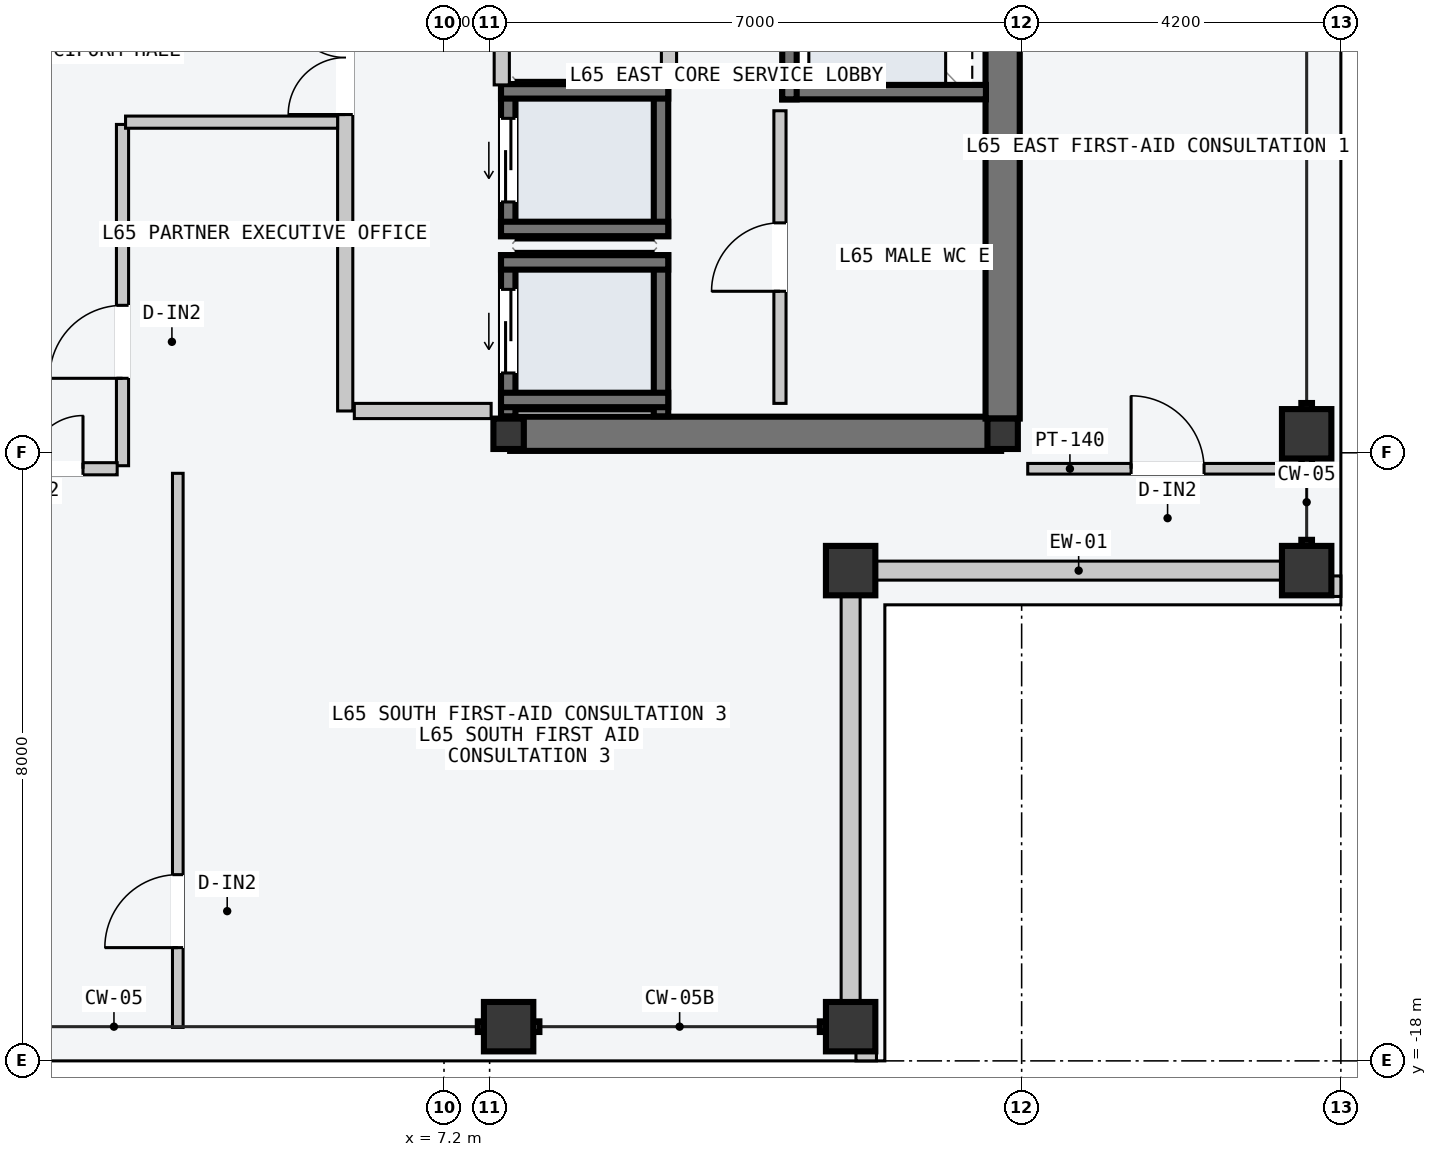
"""IFC4 building model, lengths in metres.
Left out: names, types, materials, properties, quantities, classifications, styles, units other than length and angle.
Written with IfcOpenShell. Run it as: python <this file> out.ifc"""

import sys

from ifc_helpers import new_model, si_unit, direction, frame, frame_2d, origin, origin_2d, place, context, subcontext, project, spatial, rectangle, hollow_rectangle, i_section, extrude, element, fill, save


model = new_model("IFC4")
c1 = context("Model", 3, precision=1e-05, world=origin(), true_north=direction((0.0, 1.0)))
c2 = subcontext(c1, "Body", "Model", "MODEL_VIEW")
j1 = project(units=[si_unit("LENGTHUNIT", "METRE"), si_unit("PLANEANGLEUNIT", "RADIAN")], contexts=[c1])
p1 = place(None, origin())
s1 = spatial("IfcSite", under=j1, at=p1, CompositionType="ELEMENT")
p2 = place(p1, origin())
s2 = spatial("IfcBuilding", under=s1, at=p2, CompositionType="ELEMENT")
p3 = place(p2, frame((0.0, 0.0, 247.2)))
s3 = spatial("IfcBuildingStorey", under=s2, at=p3, CompositionType="ELEMENT", Elevation=247.2)
p4 = place(p3, frame((8.07, -9.75, -0.2), z_axis=(0.0, 0.0, 1.0), x_axis=(1.0, 0.0, 0.0)))
e1 = element("IfcWall", 1, at=p4, inside=s3, PredefinedType="SHEAR", context=c2, shape_type="SweptSolid", body=[
    extrude(rectangle(XDim=6.46, YDim=0.45, at=frame_2d((3.23, 0.0))), origin(), (0.0, 0.0, 1.0), 3.6),
])
p5 = place(p3, frame((14.55, -9.55, -0.2), z_axis=(0.0, 0.0, 1.0), x_axis=(0.0, 1.0, 0.0)))
e2 = element("IfcWall", 2, at=p5, inside=s3, PredefinedType="SHEAR", context=c2, shape_type="SweptSolid", body=[
    extrude(rectangle(XDim=9.35, YDim=0.45, at=frame_2d((4.675, 0.0))), origin(), (0.0, 0.0, 1.0), 3.6),
])
for number, where, z_axis, x_axis in (
    (3, (8.05, -9.75, 0.0), (0.0, 0.0, 1.0), (1.0, 0.0, 0.0)),
    (4, (14.55, -9.75, 0.0), (0.0, 0.0, 1.0), (1.0, 0.0, 0.0)),
):
    element("IfcColumn", number, at=place(p3, frame(where, z_axis=z_axis, x_axis=x_axis)), inside=s3, PredefinedType="COLUMN", context=c2, shape_type="SweptSolid", body=[
        extrude(i_section(OverallWidth=0.4, OverallDepth=0.4, WebThickness=0.013, FlangeThickness=0.021, at=origin_2d()), origin(), (0.0, 0.0, 1.0), 3.6),
    ])
for number, where, z_axis, x_axis in (
    (5, (8.05, -17.55, 0.0), (0.0, 0.0, 1.0), (1.0, 0.0, 0.0)),
    (6, (12.55, -17.55, 0.0), (0.0, 0.0, 1.0), (1.0, 0.0, 0.0)),
    (7, (18.55, -11.55, 0.0), (0.0, 0.0, 1.0), (0.0, 1.0, 0.0)),
    (8, (18.55, -9.75, 0.0), (0.0, 0.0, 1.0), (0.0, 1.0, 0.0)),
    (9, (12.55, -11.55, 0.0), (0.0, 0.0, 1.0), (1.0, 0.0, 0.0)),
):
    element("IfcColumn", number, at=place(p3, frame(where, z_axis=z_axis, x_axis=x_axis)), inside=s3, PredefinedType="COLUMN", context=c2, shape_type="SweptSolid", body=[
        extrude(hollow_rectangle(XDim=0.65, YDim=0.65, WallThickness=0.028, at=origin_2d()), origin(), (0.0, 0.0, 1.0), 3.6),
    ])
for number, where, z_axis, x_axis in (
    (10, (12.885, -11.55, 0.0), (0.0, 0.0, 1.0), (1.0, 0.0, 0.0)),
    (11, (12.55, -17.215, 0.0), (0.0, 0.0, 1.0), (0.0, 1.0, 0.0)),
):
    element("IfcWall", number, at=place(p3, frame(where, z_axis=z_axis, x_axis=x_axis)), inside=s3, PredefinedType="STANDARD", context=c2, shape_type="SweptSolid", body=[
        extrude(rectangle(XDim=5.33, YDim=0.25, at=frame_2d((2.665, 0.0))), origin(), (0.0, 0.0, 1.0), 2.85),
    ])
for number, where, z_axis, x_axis in (
    (12, (12.62, -17.89, 0.0), (0.0, 0.0, 1.0), (1.0, 0.0, 0.0)),
    (13, (18.89, -11.89, 0.0), (0.0, 0.0, 1.0), (0.0, 1.0, 0.0)),
):
    element("IfcWall", number, at=place(p3, frame(where, z_axis=z_axis, x_axis=x_axis)), inside=s3, PredefinedType="PARAPET", context=c2, shape_type="SweptSolid", body=[
        extrude(rectangle(XDim=0.27, YDim=0.22, at=frame_2d((0.135, 0.0))), origin(), (0.0, 0.0, 1.0), 1.2),
    ])
p6 = place(p3, frame((8.045, -9.52, -0.2), z_axis=(0.0, 0.0, 1.0), x_axis=(0.0, 1.0, 0.0)))
e14 = element("IfcWall", 14, at=p6, inside=s3, PredefinedType="SOLIDWALL", context=c2, shape_type="SweptSolid", body=[
    extrude(rectangle(XDim=2.12, YDim=0.19, at=frame_2d((1.06, 0.0))), origin(), (0.0, 0.0, 1.0), 3.6),
])
p7 = place(p6, frame((0.57, 0.0, 0.2)))
e15 = element("IfcOpeningElement", 15, at=p7, cuts=e14, PredefinedType="OPENING", context=c2, shape_type="SweptSolid", body=[
    extrude(rectangle(XDim=1.1, YDim=2.2, at=frame_2d((0.55, 1.1))), frame((0.0, 0.105, 0.0), z_axis=(0.0, -1.0, 0.0), x_axis=(1.0, 0.0, 0.0)), (0.0, 0.0, 1.0), 0.21),
])
p8 = place(p3, frame((10.055, -9.52, -0.2), z_axis=(0.0, 0.0, 1.0), x_axis=(0.0, 1.0, 0.0)))
e16 = element("IfcWall", 16, at=p8, inside=s3, PredefinedType="SOLIDWALL", context=c2, shape_type="SweptSolid", body=[
    extrude(rectangle(XDim=2.12, YDim=0.19, at=frame_2d((1.06, 0.0))), origin(), (0.0, 0.0, 1.0), 3.6),
])
for number, where, z_axis, x_axis in (
    (17, (7.95, -7.495, -0.2), (0.0, 0.0, 1.0), (1.0, 0.0, 0.0)),
    (18, (7.95, -9.305, -0.2), (0.0, 0.0, 1.0), (1.0, 0.0, 0.0)),
):
    element("IfcWall", number, at=place(p3, frame(where, z_axis=z_axis, x_axis=x_axis)), inside=s3, PredefinedType="SOLIDWALL", context=c2, shape_type="SweptSolid", body=[
        extrude(rectangle(XDim=2.2, YDim=0.19, at=frame_2d((1.1, 0.0))), origin(), (0.0, 0.0, 1.0), 3.6),
    ])
p9 = place(p3, frame((8.045, -7.15, -0.2), z_axis=(0.0, 0.0, 1.0), x_axis=(0.0, 1.0, 0.0)))
e19 = element("IfcWall", 19, at=p9, inside=s3, PredefinedType="SOLIDWALL", context=c2, shape_type="SweptSolid", body=[
    extrude(rectangle(XDim=2.0, YDim=0.19, at=frame_2d((1.0, 0.0))), origin(), (0.0, 0.0, 1.0), 3.6),
])
p10 = place(p9, frame((0.45, 0.0, 0.2)))
e20 = element("IfcOpeningElement", 20, at=p10, cuts=e19, PredefinedType="OPENING", context=c2, shape_type="SweptSolid", body=[
    extrude(rectangle(XDim=1.1, YDim=2.2, at=frame_2d((0.55, 1.1))), frame((0.0, 0.105, 0.0), z_axis=(0.0, -1.0, 0.0), x_axis=(1.0, 0.0, 0.0)), (0.0, 0.0, 1.0), 0.21),
])
p11 = place(p3, frame((10.055, -7.15, -0.2), z_axis=(0.0, 0.0, 1.0), x_axis=(0.0, 1.0, 0.0)))
e21 = element("IfcWall", 21, at=p11, inside=s3, PredefinedType="SOLIDWALL", context=c2, shape_type="SweptSolid", body=[
    extrude(rectangle(XDim=2.0, YDim=0.19, at=frame_2d((1.0, 0.0))), origin(), (0.0, 0.0, 1.0), 3.6),
])
for number, where, z_axis, x_axis in (
    (22, (7.95, -5.245, -0.2), (0.0, 0.0, 1.0), (1.0, 0.0, 0.0)),
    (23, (7.95, -7.055, -0.2), (0.0, 0.0, 1.0), (1.0, 0.0, 0.0)),
):
    element("IfcWall", number, at=place(p3, frame(where, z_axis=z_axis, x_axis=x_axis)), inside=s3, PredefinedType="SOLIDWALL", context=c2, shape_type="SweptSolid", body=[
        extrude(rectangle(XDim=2.2, YDim=0.19, at=frame_2d((1.1, 0.0))), origin(), (0.0, 0.0, 1.0), 3.6),
    ])
p12 = place(p3, frame((11.65, -5.255, -0.2), z_axis=(0.0, 0.0, 1.0), x_axis=(1.0, 0.0, 0.0)))
e24 = element("IfcWall", 24, at=p12, inside=s3, PredefinedType="SOLIDWALL", context=c2, shape_type="SweptSolid", body=[
    extrude(rectangle(XDim=2.68, YDim=0.19, at=frame_2d((1.34, 0.0))), origin(), (0.0, 0.0, 1.0), 3.6),
])
p13 = place(p3, frame((11.745, -5.35, -0.2), z_axis=(0.0, 0.0, 1.0), x_axis=(0.0, 1.0, 0.0)))
e25 = element("IfcWall", 25, at=p13, inside=s3, PredefinedType="SOLIDWALL", context=c2, shape_type="SweptSolid", body=[
    extrude(rectangle(XDim=2.6, YDim=0.19, at=frame_2d((1.3, 0.0))), origin(), (0.0, 0.0, 1.0), 3.6),
])
p14 = place(p3, frame((5.9, -9.45, 0.0), z_axis=(0.0, 0.0, 1.0), x_axis=(0.0, 1.0, 0.0)))
e26 = element("IfcWall", 26, at=p14, inside=s3, PredefinedType="PARTITIONING", context=c2, shape_type="SweptSolid", body=[
    extrude(rectangle(XDim=10.5, YDim=0.2, at=frame_2d((5.25, 0.0))), origin(), (0.0, 0.0, 1.0), 3.4),
])
p15 = place(p14, frame((3.9, 0.0, 0.0)))
e27 = element("IfcOpeningElement", 27, at=p15, cuts=e26, PredefinedType="OPENING", context=c2, shape_type="SweptSolid", body=[
    extrude(rectangle(XDim=1.5, YDim=2.2, at=frame_2d((0.75, 1.1))), frame((0.0, 0.11, 0.0), z_axis=(0.0, -1.0, 0.0), x_axis=(1.0, 0.0, 0.0)), (0.0, 0.0, 1.0), 0.22),
])
p16 = place(p3, frame((6.02, -9.45, 0.0), z_axis=(0.0, 0.0, 1.0), x_axis=(1.0, 0.0, 0.0)))
e28 = element("IfcWall", 28, at=p16, inside=s3, PredefinedType="PARTITIONING", context=c2, shape_type="SweptSolid", body=[
    extrude(rectangle(XDim=1.8, YDim=0.2, at=frame_2d((0.9, 0.0))), origin(), (0.0, 0.0, 1.0), 3.4),
])
for number, where, z_axis, x_axis in (
    (29, (7.96, -5.16, 0.0), (0.0, 0.0, 1.0), (0.0, 1.0, 0.0)),
    (30, (10.16, -5.16, 0.0), (0.0, 0.0, 1.0), (0.0, 1.0, 0.0)),
):
    element("IfcWall", number, at=place(p3, frame(where, z_axis=z_axis, x_axis=x_axis)), inside=s3, PredefinedType="PARTITIONING", context=c2, shape_type="SweptSolid", body=[
        extrude(rectangle(XDim=2.44, YDim=0.2, at=frame_2d((1.22, 0.0))), origin(), (0.0, 0.0, 1.0), 3.4),
    ])
p17 = place(p3, frame((11.62, -9.35, 0.0), z_axis=(0.0, 0.0, 1.0), x_axis=(0.0, 1.0, 0.0)))
e31 = element("IfcWall", 31, at=p17, inside=s3, PredefinedType="PARTITIONING", context=c2, shape_type="SweptSolid", body=[
    extrude(rectangle(XDim=3.85, YDim=0.16, at=frame_2d((1.925, 0.0))), origin(), (0.0, 0.0, 1.0), 3.4),
])
p18 = place(p17, frame((1.475, 0.0, 0.0)))
e32 = element("IfcOpeningElement", 32, at=p18, cuts=e31, PredefinedType="OPENING", context=c2, shape_type="SweptSolid", body=[
    extrude(rectangle(XDim=0.9, YDim=2.15, at=frame_2d((0.45, 1.075))), frame((0.0, 0.09, 0.0), z_axis=(0.0, -1.0, 0.0), x_axis=(1.0, 0.0, 0.0)), (0.0, 0.0, 1.0), 0.18),
])
p19 = place(p3, frame((2.97, -10.17, 0.0), z_axis=(0.0, 0.0, 1.0), x_axis=(0.0, 1.0, 0.0)))
e33 = element("IfcWall", 33, at=p19, inside=s3, PredefinedType="PARTITIONING", context=c2, shape_type="SweptSolid", body=[
    extrude(rectangle(XDim=4.49, YDim=0.16, at=frame_2d((2.245, 0.0))), origin(), (0.0, 0.0, 1.0), 3.4),
])
p20 = place(p19, frame((1.15, 0.0, 0.0)))
e34 = element("IfcOpeningElement", 34, at=p20, cuts=e33, PredefinedType="OPENING", context=c2, shape_type="SweptSolid", body=[
    extrude(rectangle(XDim=0.96, YDim=2.18, at=frame_2d((0.48, 1.09))), frame((0.0, 0.09, 0.0), z_axis=(0.0, -1.0, 0.0), x_axis=(1.0, 0.0, 0.0)), (0.0, 0.0, 1.0), 0.18),
])
p21 = place(p3, frame((3.01, -5.65, 0.0), z_axis=(0.0, 0.0, 1.0), x_axis=(1.0, 0.0, 0.0)))
e35 = element("IfcWall", 35, at=p21, inside=s3, PredefinedType="PARTITIONING", context=c2, shape_type="SweptSolid", body=[
    extrude(rectangle(XDim=2.79, YDim=0.16, at=frame_2d((1.395, 0.0))), origin(), (0.0, 0.0, 1.0), 3.4),
])
p22 = place(p3, frame((3.698, -17.56, 0.0), z_axis=(0.0, 0.0, 1.0), x_axis=(0.0, 1.0, 0.0)))
e36 = element("IfcWall", 36, at=p22, inside=s3, PredefinedType="PARTITIONING", context=c2, shape_type="SweptSolid", body=[
    extrude(rectangle(XDim=7.29, YDim=0.14, at=frame_2d((3.645, 0.0))), origin(), (0.0, 0.0, 1.0), 3.4),
])
p23 = place(p22, frame((1.05, 0.0, 0.0)))
e37 = element("IfcOpeningElement", 37, at=p23, cuts=e36, PredefinedType="OPENING", context=c2, shape_type="SweptSolid", body=[
    extrude(rectangle(XDim=0.96, YDim=2.18, at=frame_2d((0.48, 1.09))), frame((0.0, 0.08, 0.0), z_axis=(0.0, -1.0, 0.0), x_axis=(1.0, 0.0, 0.0)), (0.0, 0.0, 1.0), 0.16),
])
p24 = place(p3, frame((0.6, -10.21, 0.0), z_axis=(0.0, 0.0, 1.0), x_axis=(1.0, 0.0, 0.0)))
e38 = element("IfcWall", 38, at=p24, inside=s3, PredefinedType="PARTITIONING", context=c2, shape_type="SweptSolid", body=[
    extrude(rectangle(XDim=2.3, YDim=0.16, at=frame_2d((1.15, 0.0))), origin(), (0.0, 0.0, 1.0), 3.4),
])
p25 = place(p24, frame((0.45, 0.0, 0.0)))
e39 = element("IfcOpeningElement", 39, at=p25, cuts=e38, PredefinedType="OPENING", context=c2, shape_type="SweptSolid", body=[
    extrude(rectangle(XDim=1.4, YDim=2.2, at=frame_2d((0.7, 1.1))), frame((0.0, 0.09, 0.0), z_axis=(0.0, -1.0, 0.0), x_axis=(1.0, 0.0, 0.0)), (0.0, 0.0, 1.0), 0.18),
])
p26 = place(p3, frame((14.88, -10.21, 0.0), z_axis=(0.0, 0.0, 1.0), x_axis=(1.0, 0.0, 0.0)))
e40 = element("IfcWall", 40, at=p26, inside=s3, PredefinedType="PARTITIONING", context=c2, shape_type="SweptSolid", body=[
    extrude(rectangle(XDim=3.68, YDim=0.14, at=frame_2d((1.84, 0.0))), origin(), (0.0, 0.0, 1.0), 3.4),
])
p27 = place(p26, frame((1.36, 0.0, 0.0)))
e41 = element("IfcOpeningElement", 41, at=p27, cuts=e40, PredefinedType="OPENING", context=c2, shape_type="SweptSolid", body=[
    extrude(rectangle(XDim=0.96, YDim=2.18, at=frame_2d((0.48, 1.09))), frame((0.0, 0.08, 0.0), z_axis=(0.0, -1.0, 0.0), x_axis=(1.0, 0.0, 0.0)), (0.0, 0.0, 1.0), 0.16),
])
p28 = place(p7, origin())
e42 = element("IfcDoor", 42, at=p28, inside=s3, OperationType="SLIDING_TO_LEFT", PredefinedType="DOOR", context=c2, shape_type="SweptSolid", body=[
    extrude(rectangle(XDim=1.1, YDim=2.2, at=frame_2d((0.55, 1.1))), frame((0.0, 0.025, 0.0), z_axis=(0.0, -1.0, 0.0), x_axis=(1.0, 0.0, 0.0)), (0.0, 0.0, 1.0), 0.05),
])
fill(e15, e42)
p29 = place(p10, origin())
e43 = element("IfcDoor", 43, at=p29, inside=s3, OperationType="SLIDING_TO_LEFT", PredefinedType="DOOR", context=c2, shape_type="SweptSolid", body=[
    extrude(rectangle(XDim=1.1, YDim=2.2, at=frame_2d((0.55, 1.1))), frame((0.0, 0.025, 0.0), z_axis=(0.0, -1.0, 0.0), x_axis=(1.0, 0.0, 0.0)), (0.0, 0.0, 1.0), 0.05),
])
fill(e20, e43)
p30 = place(p15, origin())
e44 = element("IfcDoor", 44, at=p30, inside=s3, OperationType="DOUBLE_DOOR_SINGLE_SWING", PredefinedType="DOOR", context=c2, shape_type="SweptSolid", body=[
    extrude(rectangle(XDim=1.5, YDim=2.2, at=frame_2d((0.75, 1.1))), frame((0.0, 0.025, 0.0), z_axis=(0.0, -1.0, 0.0), x_axis=(1.0, 0.0, 0.0)), (0.0, 0.0, 1.0), 0.05),
])
fill(e27, e44)
p31 = place(p18, origin())
e45 = element("IfcDoor", 45, at=p31, inside=s3, OperationType="SINGLE_SWING_LEFT", PredefinedType="DOOR", context=c2, shape_type="SweptSolid", body=[
    extrude(rectangle(XDim=0.9, YDim=2.15, at=frame_2d((0.45, 1.075))), frame((0.0, 0.025, 0.0), z_axis=(0.0, -1.0, 0.0), x_axis=(1.0, 0.0, 0.0)), (0.0, 0.0, 1.0), 0.05),
])
fill(e32, e45)
p32 = place(p20, origin())
e46 = element("IfcDoor", 46, at=p32, inside=s3, OperationType="SINGLE_SWING_LEFT", PredefinedType="DOOR", context=c2, shape_type="SweptSolid", body=[
    extrude(rectangle(XDim=0.96, YDim=2.18, at=frame_2d((0.48, 1.09))), frame((0.0, 0.025, 0.0), z_axis=(0.0, -1.0, 0.0), x_axis=(1.0, 0.0, 0.0)), (0.0, 0.0, 1.0), 0.05),
])
fill(e34, e46)
p33 = place(p23, origin())
e47 = element("IfcDoor", 47, at=p33, inside=s3, OperationType="SINGLE_SWING_LEFT", PredefinedType="DOOR", context=c2, shape_type="SweptSolid", body=[
    extrude(rectangle(XDim=0.96, YDim=2.18, at=frame_2d((0.48, 1.09))), frame((0.0, 0.025, 0.0), z_axis=(0.0, -1.0, 0.0), x_axis=(1.0, 0.0, 0.0)), (0.0, 0.0, 1.0), 0.05),
])
fill(e37, e47)
p34 = place(p25, origin())
e48 = element("IfcDoor", 48, at=p34, inside=s3, OperationType="DOUBLE_DOOR_SINGLE_SWING", PredefinedType="DOOR", context=c2, shape_type="SweptSolid", body=[
    extrude(rectangle(XDim=1.4, YDim=2.2, at=frame_2d((0.7, 1.1))), frame((0.0, 0.025, 0.0), z_axis=(0.0, -1.0, 0.0), x_axis=(1.0, 0.0, 0.0)), (0.0, 0.0, 1.0), 0.05),
])
fill(e39, e48)
p35 = place(p27, origin())
e49 = element("IfcDoor", 49, at=p35, inside=s3, OperationType="SINGLE_SWING_LEFT", PredefinedType="DOOR", context=c2, shape_type="SweptSolid", body=[
    extrude(rectangle(XDim=0.96, YDim=2.18, at=frame_2d((0.48, 1.09))), frame((0.0, 0.025, 0.0), z_axis=(0.0, -1.0, 0.0), x_axis=(1.0, 0.0, 0.0)), (0.0, 0.0, 1.0), 0.05),
])
fill(e41, e49)
save(model, sys.argv[1])
